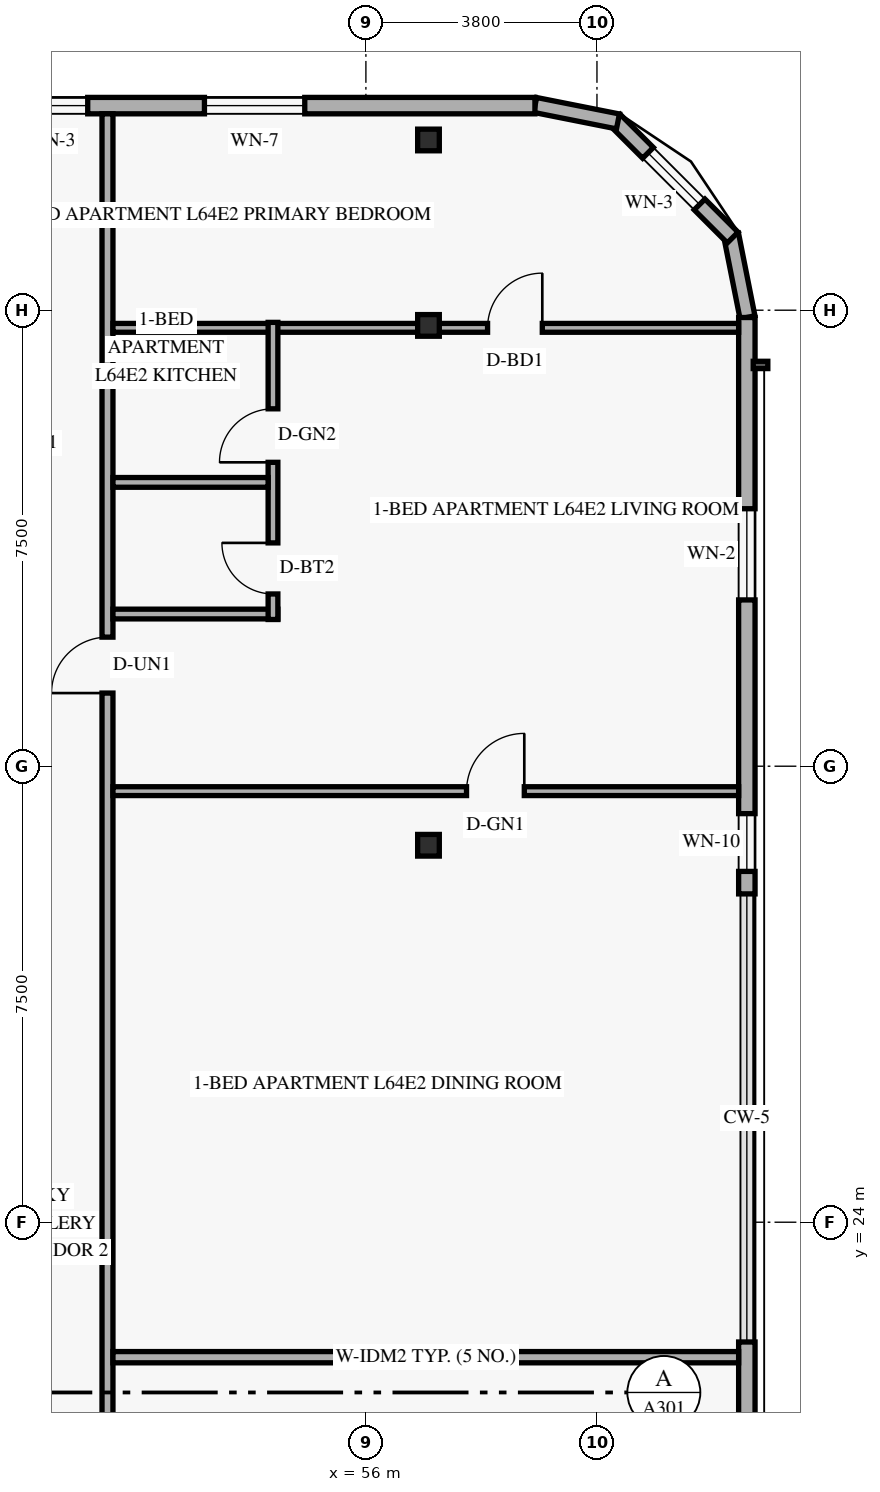
"""IFC4 building model, lengths in metres.
Left out: names, types, materials, properties, quantities, classifications, styles, units other than length and angle.
Written with IfcOpenShell. Run it as: python <this file> out.ifc"""

import sys

from ifc_helpers import new_model, si_unit, direction, frame, frame_2d, origin, origin_2d, place, context, subcontext, project, spatial, rectangle, hollow_rectangle, extrude, element, fill, save


model = new_model("IFC4")
c1 = context("Model", 3, precision=1e-05, world=origin(), true_north=direction((0.0, 1.0)))
c2 = subcontext(c1, "Body", "Model", "MODEL_VIEW")
j1 = project(units=[si_unit("LENGTHUNIT", "METRE"), si_unit("PLANEANGLEUNIT", "RADIAN")], contexts=[c1])
p1 = place(None, origin())
s1 = spatial("IfcSite", under=j1, at=p1, CompositionType="ELEMENT")
p2 = place(p1, origin())
s2 = spatial("IfcBuilding", under=s1, at=p2, CompositionType="ELEMENT")
p3 = place(p2, frame((0.0, 0.0, 246.0)))
s3 = spatial("IfcBuildingStorey", under=s2, at=p3, CompositionType="ELEMENT", Elevation=246.0)
for number, where, z_axis, x_axis in (
    (1, (56.925, 30.2, 0.0), (0.058, 0.0, 0.998), (0.0, 1.0, 0.0)),
    (2, (56.925, 38.75, 0.0), (0.058, 0.0, 0.998), (0.0, 1.0, 0.0)),
    (3, (56.925, 41.8, 0.0), (0.058, 0.0, 0.998), (0.0, 1.0, 0.0)),
):
    element("IfcColumn", number, at=place(p3, frame(where, z_axis=z_axis, x_axis=x_axis)), inside=s3, PredefinedType="COLUMN", context=c2, shape_type="SweptSolid", body=[
        extrude(hollow_rectangle(XDim=0.356, YDim=0.356, WallThickness=0.016, at=origin_2d()), origin(), (0.0, 0.0, 1.0), 3.606),
    ])
p4 = place(p3, frame((62.276, 38.884, 0.0), z_axis=(0.0, 0.0, 1.0), x_axis=(-0.195135625965, 0.9807762678, 0.0)))
e4 = element("IfcWall", 4, at=p4, inside=s3, PredefinedType="SOLIDWALL", context=c2, shape_type="SweptSolid", body=[
    extrude(rectangle(XDim=1.389, YDim=0.25, at=frame_2d((0.694, 0.0))), origin(), (0.0, 0.0, 1.0), 3.36),
])
p5 = place(p3, frame((62.032, 40.195, 0.0), z_axis=(0.0, 0.0, 1.0), x_axis=(-0.707106781187, 0.707106781187, 0.0)))
e5 = element("IfcWall", 5, at=p5, inside=s3, PredefinedType="SOLIDWALL", context=c2, shape_type="SweptSolid", body=[
    extrude(rectangle(XDim=2.739, YDim=0.25, at=frame_2d((1.37, 0.0))), origin(), (0.0, 0.0, 1.0), 3.36),
])
p6 = place(p5, frame((0.77, 0.0, 0.85)))
e6 = element("IfcOpeningElement", 6, at=p6, cuts=e5, PredefinedType="OPENING", context=c2, shape_type="SweptSolid", body=[
    extrude(rectangle(XDim=1.2, YDim=1.5, at=frame_2d((0.6, 0.75))), frame((0.0, 0.135, 0.0), z_axis=(0.0, -1.0, 0.0), x_axis=(1.0, 0.0, 0.0)), (0.0, 0.0, 1.0), 0.27),
])
p7 = place(p3, frame((60.146, 42.105, 0.0), z_axis=(0.0, 0.0, 1.0), x_axis=(-0.980809899341, 0.19496651342, 0.0)))
e7 = element("IfcWall", 7, at=p7, inside=s3, PredefinedType="SOLIDWALL", context=c2, shape_type="SweptSolid", body=[
    extrude(rectangle(XDim=1.389, YDim=0.25, at=frame_2d((0.694, 0.0))), origin(), (0.0, 0.0, 1.0), 3.36),
])
p8 = place(p3, frame((62.265, 9.12, 0.0), z_axis=(0.0, 0.0, 1.0), x_axis=(0.0, 1.0, 0.0)))
e8 = element("IfcWall", 8, at=p8, inside=s3, PredefinedType="SOLIDWALL", context=c2, shape_type="SweptSolid", body=[
    extrude(rectangle(XDim=12.91, YDim=0.27, at=frame_2d((6.455, 0.0))), origin(), (0.0, 0.0, 1.0), 3.36),
])
p9 = place(p8, frame((3.125, 0.0, 0.85)))
e9 = element("IfcOpeningElement", 9, at=p9, cuts=e8, PredefinedType="OPENING", context=c2, shape_type="SweptSolid", body=[
    extrude(rectangle(XDim=1.5, YDim=1.55, at=frame_2d((0.75, 0.775))), frame((0.0, 0.145, 0.0), z_axis=(0.0, -1.0, 0.0), x_axis=(1.0, 0.0, 0.0)), (0.0, 0.0, 1.0), 0.29),
])
p10 = place(p8, frame((9.579, 0.0, 0.85)))
e10 = element("IfcOpeningElement", 10, at=p10, cuts=e8, PredefinedType="OPENING", context=c2, shape_type="SweptSolid", body=[
    extrude(rectangle(XDim=1.5, YDim=1.55, at=frame_2d((0.75, 0.775))), frame((0.0, 0.145, 0.0), z_axis=(0.0, -1.0, 0.0), x_axis=(1.0, 0.0, 0.0)), (0.0, 0.0, 1.0), 0.29),
])
p11 = place(p3, frame((62.265, 29.4, 0.0), z_axis=(0.0, 0.0, 1.0), x_axis=(0.0, 1.0, 0.0)))
e11 = element("IfcWall", 11, at=p11, inside=s3, PredefinedType="SOLIDWALL", context=c2, shape_type="SweptSolid", body=[
    extrude(rectangle(XDim=9.48, YDim=0.27, at=frame_2d((4.74, 0.0))), origin(), (0.0, 0.0, 1.0), 3.36),
])
p12 = place(p11, frame((0.37, 0.0, 0.85)))
e12 = element("IfcOpeningElement", 12, at=p12, cuts=e11, PredefinedType="OPENING", context=c2, shape_type="SweptSolid", body=[
    extrude(rectangle(XDim=0.95, YDim=1.5, at=frame_2d((0.475, 0.75))), frame((0.0, 0.145, 0.0), z_axis=(0.0, -1.0, 0.0), x_axis=(1.0, 0.0, 0.0)), (0.0, 0.0, 1.0), 0.29),
])
p13 = place(p11, frame((4.835, 0.0, 0.85)))
e13 = element("IfcOpeningElement", 13, at=p13, cuts=e11, PredefinedType="OPENING", context=c2, shape_type="SweptSolid", body=[
    extrude(rectangle(XDim=1.5, YDim=1.55, at=frame_2d((0.75, 0.775))), frame((0.0, 0.145, 0.0), z_axis=(0.0, -1.0, 0.0), x_axis=(1.0, 0.0, 0.0)), (0.0, 0.0, 1.0), 0.29),
])
p14 = place(p3, frame((58.78, 42.365, 0.0), z_axis=(0.0, 0.0, 1.0), x_axis=(-1.0, 0.0, 0.0)))
e14 = element("IfcWall", 14, at=p14, inside=s3, PredefinedType="SOLIDWALL", context=c2, shape_type="SweptSolid", body=[
    extrude(rectangle(XDim=32.96, YDim=0.27, at=frame_2d((16.48, 0.0))), origin(), (0.0, 0.0, 1.0), 3.36),
])
p15 = place(p14, frame((27.665, 0.0, 0.85)))
e15 = element("IfcOpeningElement", 15, at=p15, cuts=e14, PredefinedType="OPENING", context=c2, shape_type="SweptSolid", body=[
    extrude(rectangle(XDim=1.65, YDim=1.6, at=frame_2d((0.825, 0.8))), frame((0.0, 0.145, 0.0), z_axis=(0.0, -1.0, 0.0), x_axis=(1.0, 0.0, 0.0)), (0.0, 0.0, 1.0), 0.29),
])
p16 = place(p14, frame((11.771, 0.0, 0.85)))
e16 = element("IfcOpeningElement", 16, at=p16, cuts=e14, PredefinedType="OPENING", context=c2, shape_type="SweptSolid", body=[
    extrude(rectangle(XDim=1.65, YDim=1.6, at=frame_2d((0.825, 0.8))), frame((0.0, 0.145, 0.0), z_axis=(0.0, -1.0, 0.0), x_axis=(1.0, 0.0, 0.0)), (0.0, 0.0, 1.0), 0.29),
])
p17 = place(p14, frame((7.355, 0.0, 0.85)))
e17 = element("IfcOpeningElement", 17, at=p17, cuts=e14, PredefinedType="OPENING", context=c2, shape_type="SweptSolid", body=[
    extrude(rectangle(XDim=1.2, YDim=1.5, at=frame_2d((0.6, 0.75))), frame((0.0, 0.145, 0.0), z_axis=(0.0, -1.0, 0.0), x_axis=(1.0, 0.0, 0.0)), (0.0, 0.0, 1.0), 0.29),
])
p18 = place(p14, frame((3.785, 0.0, 0.85)))
e18 = element("IfcOpeningElement", 18, at=p18, cuts=e14, PredefinedType="OPENING", context=c2, shape_type="SweptSolid", body=[
    extrude(rectangle(XDim=1.65, YDim=1.6, at=frame_2d((0.825, 0.8))), frame((0.0, 0.145, 0.0), z_axis=(0.0, -1.0, 0.0), x_axis=(1.0, 0.0, 0.0)), (0.0, 0.0, 1.0), 0.29),
])
p19 = place(p3, frame((51.75, 5.77, 0.0), z_axis=(0.0, 0.0, 1.0), x_axis=(0.0, 1.0, 0.0)))
e19 = element("IfcWall", 19, at=p19, inside=s3, PredefinedType="STANDARD", context=c2, shape_type="SweptSolid", body=[
    extrude(rectangle(XDim=36.46, YDim=0.18, at=frame_2d((18.23, 0.0))), origin(), (0.0, 0.0, 1.0), 2.803),
])
p20 = place(p19, frame((8.559, 0.0, 0.0)))
e20 = element("IfcOpeningElement", 20, at=p20, cuts=e19, PredefinedType="OPENING", context=c2, shape_type="SweptSolid", body=[
    extrude(rectangle(XDim=0.92, YDim=2.15, at=frame_2d((0.46, 1.075))), frame((0.0, 0.1, 0.0), z_axis=(0.0, -1.0, 0.0), x_axis=(1.0, 0.0, 0.0)), (0.0, 0.0, 1.0), 0.2),
])
p21 = place(p19, frame((26.933, 0.0, 0.0)))
e21 = element("IfcOpeningElement", 21, at=p21, cuts=e19, PredefinedType="OPENING", context=c2, shape_type="SweptSolid", body=[
    extrude(rectangle(XDim=0.92, YDim=2.15, at=frame_2d((0.46, 1.075))), frame((0.0, 0.1, 0.0), z_axis=(0.0, -1.0, 0.0), x_axis=(1.0, 0.0, 0.0)), (0.0, 0.0, 1.0), 0.2),
])
p22 = place(p3, frame((51.84, 21.78, 0.0), z_axis=(0.0, 0.0, 1.0), x_axis=(1.0, 0.0, 0.0)))
e22 = element("IfcWall", 22, at=p22, inside=s3, PredefinedType="PARTITIONING", context=c2, shape_type="SweptSolid", body=[
    extrude(rectangle(XDim=10.29, YDim=0.185, at=frame_2d((5.145, 0.0))), origin(), (0.0, 0.0, 1.0), 2.879),
])
p23 = place(p3, frame((51.84, 38.71, 0.0), z_axis=(0.0, 0.0, 1.0), x_axis=(1.0, 0.0, 0.0)))
e23 = element("IfcWall", 23, at=p23, inside=s3, PredefinedType="PARTITIONING", context=c2, shape_type="SweptSolid", body=[
    extrude(rectangle(XDim=10.29, YDim=0.145, at=frame_2d((5.145, 0.0))), origin(), (0.0, 0.0, 1.0), 2.803),
])
p24 = place(p23, frame((6.161, 0.0, 0.0)))
e24 = element("IfcOpeningElement", 24, at=p24, cuts=e23, PredefinedType="OPENING", context=c2, shape_type="SweptSolid", body=[
    extrude(rectangle(XDim=0.9, YDim=2.14, at=frame_2d((0.45, 1.07))), frame((0.0, 0.083, 0.0), z_axis=(0.0, -1.0, 0.0), x_axis=(1.0, 0.0, 0.0)), (0.0, 0.0, 1.0), 0.165),
])
p25 = place(p3, frame((51.84, 34.003, 0.0), z_axis=(0.0, 0.0, 1.0), x_axis=(1.0, 0.0, 0.0)))
e25 = element("IfcWall", 25, at=p25, inside=s3, PredefinedType="PLUMBINGWALL", context=c2, shape_type="SweptSolid", body=[
    extrude(rectangle(XDim=2.712, YDim=0.16, at=frame_2d((1.356, 0.0))), origin(), (0.0, 0.0, 1.0), 3.36),
])
p26 = place(p3, frame((54.472, 33.913, 0.0), z_axis=(0.0, 0.0, 1.0), x_axis=(0.0, 1.0, 0.0)))
e26 = element("IfcWall", 26, at=p26, inside=s3, PredefinedType="PLUMBINGWALL", context=c2, shape_type="SweptSolid", body=[
    extrude(rectangle(XDim=4.887, YDim=0.16, at=frame_2d((2.443, 0.0))), origin(), (0.0, 0.0, 1.0), 2.803),
])
p27 = place(p26, frame((0.42, 0.0, 0.0)))
e27 = element("IfcOpeningElement", 27, at=p27, cuts=e26, PredefinedType="OPENING", context=c2, shape_type="SweptSolid", body=[
    extrude(rectangle(XDim=0.84, YDim=2.12, at=frame_2d((0.42, 1.06))), frame((0.0, 0.09, 0.0), z_axis=(0.0, -1.0, 0.0), x_axis=(1.0, 0.0, 0.0)), (0.0, 0.0, 1.0), 0.18),
])
p28 = place(p26, frame((2.585, 0.0, 0.0)))
e28 = element("IfcOpeningElement", 28, at=p28, cuts=e26, PredefinedType="OPENING", context=c2, shape_type="SweptSolid", body=[
    extrude(rectangle(XDim=0.88, YDim=2.12, at=frame_2d((0.44, 1.06))), frame((0.0, 0.09, 0.0), z_axis=(0.0, -1.0, 0.0), x_axis=(1.0, 0.0, 0.0)), (0.0, 0.0, 1.0), 0.18),
])
p29 = place(p3, frame((51.84, 36.168, 0.0), z_axis=(0.0, 0.0, 1.0), x_axis=(1.0, 0.0, 0.0)))
e29 = element("IfcWall", 29, at=p29, inside=s3, PredefinedType="PLUMBINGWALL", context=c2, shape_type="SweptSolid", body=[
    extrude(rectangle(XDim=2.552, YDim=0.16, at=frame_2d((1.276, 0.0))), origin(), (0.0, 0.0, 1.0), 3.36),
])
p30 = place(p3, frame((51.84, 31.09, 0.0), z_axis=(0.0, 0.0, 1.0), x_axis=(1.0, 0.0, 0.0)))
e30 = element("IfcWall", 30, at=p30, inside=s3, PredefinedType="PARTITIONING", context=c2, shape_type="SweptSolid", body=[
    extrude(rectangle(XDim=10.29, YDim=0.145, at=frame_2d((5.145, 0.0))), origin(), (0.0, 0.0, 1.0), 2.879),
])
p31 = place(p30, frame((5.815, 0.0, 0.0)))
e31 = element("IfcOpeningElement", 31, at=p31, cuts=e30, PredefinedType="OPENING", context=c2, shape_type="SweptSolid", body=[
    extrude(rectangle(XDim=0.95, YDim=2.15, at=frame_2d((0.475, 1.075))), frame((0.0, 0.083, 0.0), z_axis=(0.0, -1.0, 0.0), x_axis=(1.0, 0.0, 0.0)), (0.0, 0.0, 1.0), 0.165),
])
p32 = place(p6, origin())
e32 = element("IfcWindow", 32, at=p32, inside=s3, PartitioningType="SINGLE_PANEL", PredefinedType="WINDOW", context=c2, shape_type="SweptSolid", body=[
    extrude(rectangle(XDim=1.2, YDim=1.5, at=frame_2d((0.6, 0.75))), frame((0.0, 0.03, 0.0), z_axis=(0.0, -1.0, 0.0), x_axis=(1.0, 0.0, 0.0)), (0.0, 0.0, 1.0), 0.06),
])
fill(e6, e32)
p33 = place(p12, origin())
e33 = element("IfcWindow", 33, at=p33, inside=s3, PartitioningType="SINGLE_PANEL", PredefinedType="WINDOW", context=c2, shape_type="SweptSolid", body=[
    extrude(rectangle(XDim=0.95, YDim=1.5, at=frame_2d((0.475, 0.75))), frame((0.0, 0.03, 0.0), z_axis=(0.0, -1.0, 0.0), x_axis=(1.0, 0.0, 0.0)), (0.0, 0.0, 1.0), 0.06),
])
fill(e12, e33)
p34 = place(p13, origin())
e34 = element("IfcWindow", 34, at=p34, inside=s3, PartitioningType="SINGLE_PANEL", PredefinedType="WINDOW", context=c2, shape_type="SweptSolid", body=[
    extrude(rectangle(XDim=1.5, YDim=1.55, at=frame_2d((0.75, 0.775))), frame((0.0, 0.03, 0.0), z_axis=(0.0, -1.0, 0.0), x_axis=(1.0, 0.0, 0.0)), (0.0, 0.0, 1.0), 0.06),
])
fill(e13, e34)
p35 = place(p17, origin())
e35 = element("IfcWindow", 35, at=p35, inside=s3, PartitioningType="SINGLE_PANEL", PredefinedType="WINDOW", context=c2, shape_type="SweptSolid", body=[
    extrude(rectangle(XDim=1.2, YDim=1.5, at=frame_2d((0.6, 0.75))), frame((0.0, 0.03, 0.0), z_axis=(0.0, -1.0, 0.0), x_axis=(1.0, 0.0, 0.0)), (0.0, 0.0, 1.0), 0.06),
])
fill(e17, e35)
p36 = place(p18, origin())
e36 = element("IfcWindow", 36, at=p36, inside=s3, PartitioningType="SINGLE_PANEL", PredefinedType="WINDOW", context=c2, shape_type="SweptSolid", body=[
    extrude(rectangle(XDim=1.65, YDim=1.6, at=frame_2d((0.825, 0.8))), frame((0.0, 0.03, 0.0), z_axis=(0.0, -1.0, 0.0), x_axis=(1.0, 0.0, 0.0)), (0.0, 0.0, 1.0), 0.06),
])
fill(e18, e36)
p37 = place(p31, origin())
e37 = element("IfcDoor", 37, at=p37, inside=s3, OperationType="SINGLE_SWING_RIGHT", PredefinedType="DOOR", context=c2, shape_type="SweptSolid", body=[
    extrude(rectangle(XDim=0.95, YDim=2.15, at=frame_2d((0.475, 1.075))), frame((0.0, 0.025, 0.0), z_axis=(0.0, -1.0, 0.0), x_axis=(1.0, 0.0, 0.0)), (0.0, 0.0, 1.0), 0.05),
])
fill(e31, e37)
p38 = place(p21, origin())
e38 = element("IfcDoor", 38, at=p38, inside=s3, OperationType="SINGLE_SWING_LEFT", PredefinedType="DOOR", context=c2, shape_type="SweptSolid", body=[
    extrude(rectangle(XDim=0.92, YDim=2.15, at=frame_2d((0.46, 1.075))), frame((0.0, 0.025, 0.0), z_axis=(0.0, -1.0, 0.0), x_axis=(1.0, 0.0, 0.0)), (0.0, 0.0, 1.0), 0.05),
])
fill(e21, e38)
p39 = place(p27, origin())
e39 = element("IfcDoor", 39, at=p39, inside=s3, OperationType="SINGLE_SWING_RIGHT", PredefinedType="DOOR", context=c2, shape_type="SweptSolid", body=[
    extrude(rectangle(XDim=0.84, YDim=2.12, at=frame_2d((0.42, 1.06))), frame((0.0, 0.025, 0.0), z_axis=(0.0, -1.0, 0.0), x_axis=(1.0, 0.0, 0.0)), (0.0, 0.0, 1.0), 0.05),
])
fill(e27, e39)
p40 = place(p28, origin())
e40 = element("IfcDoor", 40, at=p40, inside=s3, OperationType="SINGLE_SWING_LEFT", PredefinedType="DOOR", context=c2, shape_type="SweptSolid", body=[
    extrude(rectangle(XDim=0.88, YDim=2.12, at=frame_2d((0.44, 1.06))), frame((0.0, 0.025, 0.0), z_axis=(0.0, -1.0, 0.0), x_axis=(1.0, 0.0, 0.0)), (0.0, 0.0, 1.0), 0.05),
])
fill(e28, e40)
p41 = place(p24, origin())
e41 = element("IfcDoor", 41, at=p41, inside=s3, OperationType="SINGLE_SWING_RIGHT", PredefinedType="DOOR", context=c2, shape_type="SweptSolid", body=[
    extrude(rectangle(XDim=0.9, YDim=2.14, at=frame_2d((0.45, 1.07))), frame((0.0, 0.025, 0.0), z_axis=(0.0, -1.0, 0.0), x_axis=(1.0, 0.0, 0.0)), (0.0, 0.0, 1.0), 0.05),
])
fill(e24, e41)
save(model, sys.argv[1])
